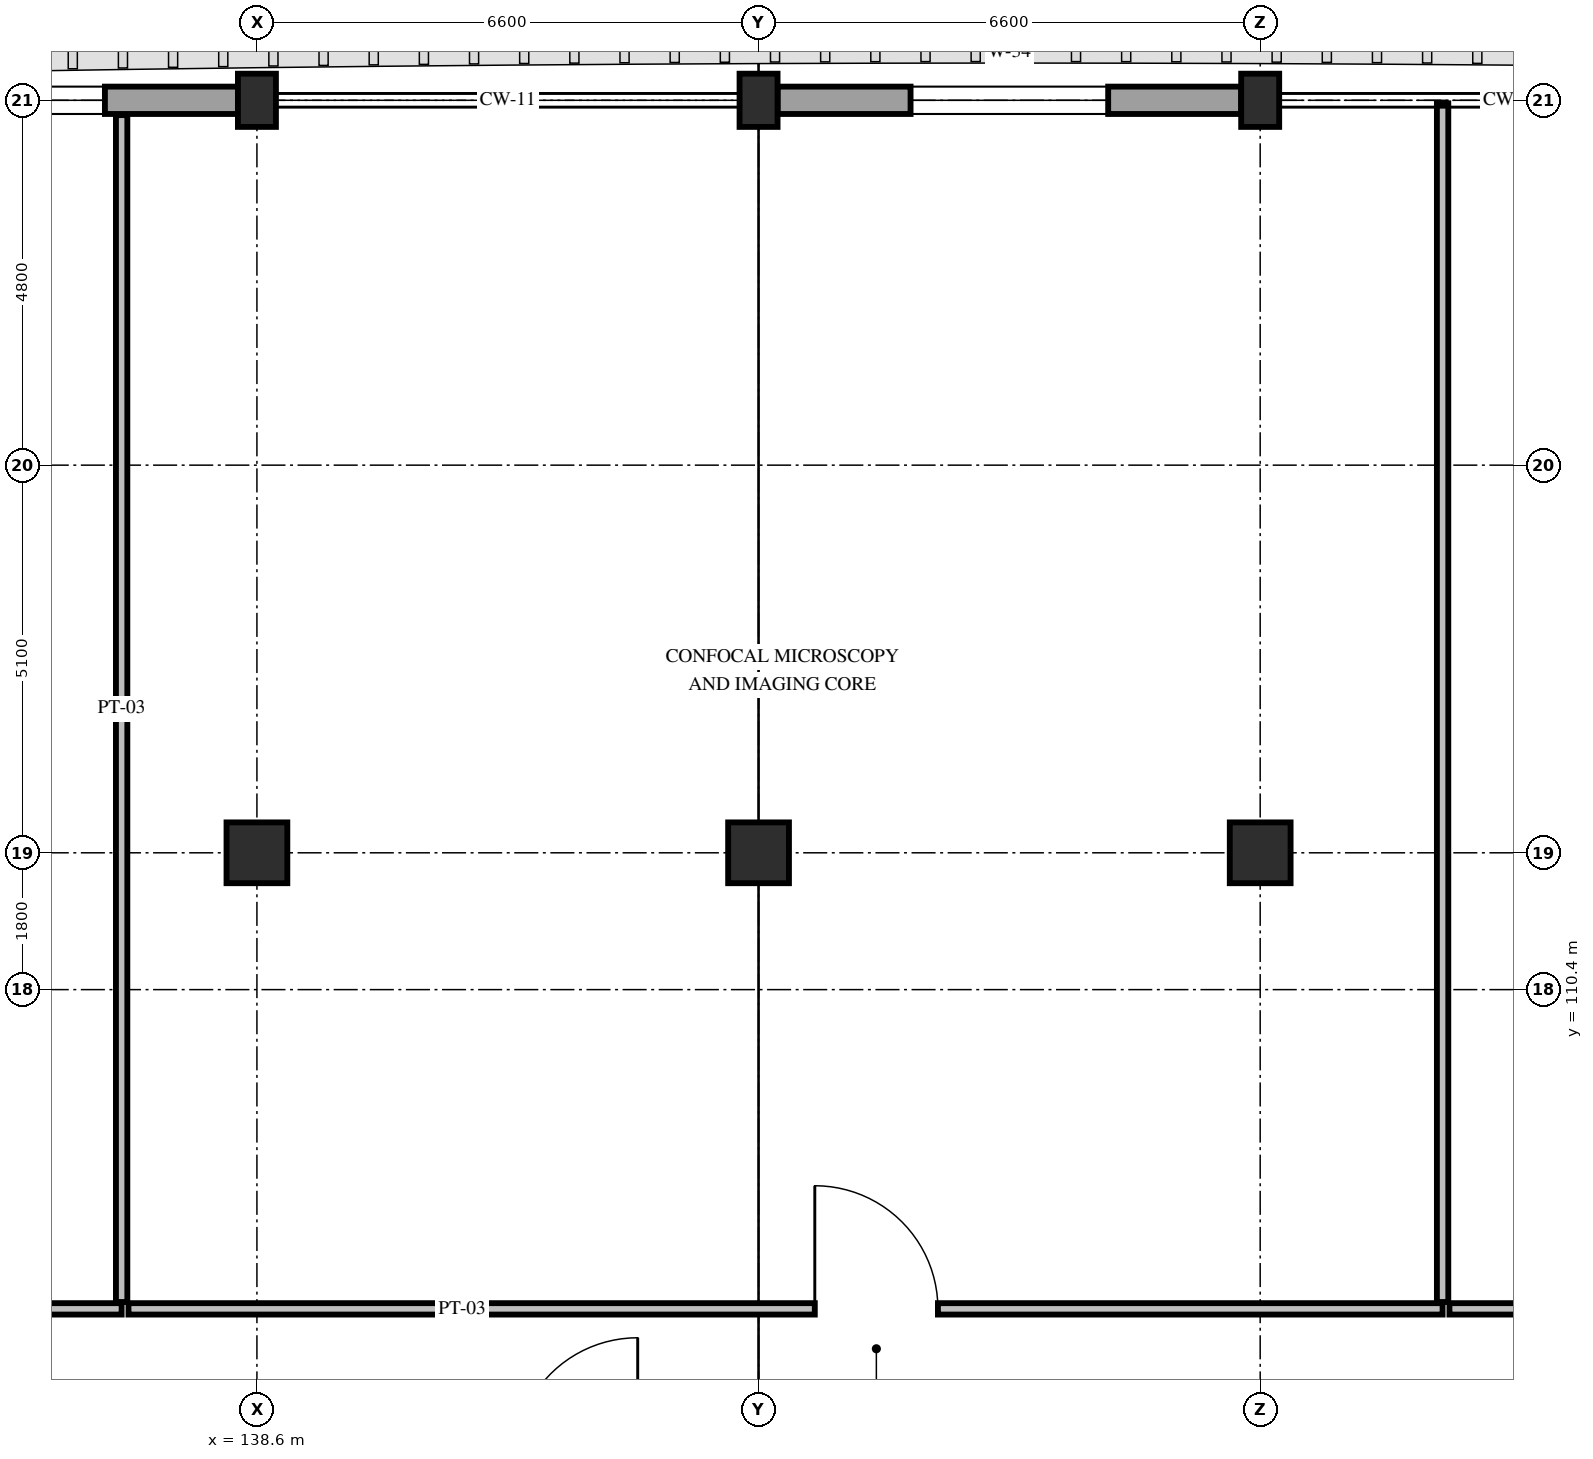
"""IFC4 building model, lengths in metres.
Left out: names, types, materials, properties, quantities, classifications, styles, units other than length and angle.
Written with IfcOpenShell. Run it as: python <this file> out.ifc"""

import sys

from ifc_helpers import new_model, si_unit, direction, frame, frame_2d, origin, origin_2d, place, context, subcontext, project, spatial, rectangle, extrude, element, fill, save


model = new_model("IFC4")
c1 = context("Model", 3, precision=1e-05, world=origin(), true_north=direction((0.0, 1.0)))
c2 = subcontext(c1, "Body", "Model", "MODEL_VIEW")
j1 = project(units=[si_unit("LENGTHUNIT", "METRE"), si_unit("PLANEANGLEUNIT", "RADIAN")], contexts=[c1])
p1 = place(None, origin())
s1 = spatial("IfcSite", under=j1, at=p1, CompositionType="ELEMENT")
p2 = place(p1, origin())
s2 = spatial("IfcBuilding", under=s1, at=p2, CompositionType="ELEMENT")
p3 = place(p2, frame((0.0, 0.0, 10.2)))
s3 = spatial("IfcBuildingStorey", under=s2, at=p3, CompositionType="ELEMENT", Elevation=10.2)
p4 = place(p3, frame((138.6, 112.2, 0.0), z_axis=(0.0, 0.0, 1.0), x_axis=(1.0, 0.0, 0.0)))
e1 = element("IfcColumn", 1, at=p4, inside=s3, PredefinedType="COLUMN", context=c2, shape_type="SweptSolid", body=[
    extrude(rectangle(XDim=0.8, YDim=0.8, at=origin_2d()), origin(), (0.0, 0.0, 1.0), 4.8),
])
p5 = place(p3, frame((138.6, 122.1, 0.0), z_axis=(0.0, 0.0, 1.0), x_axis=(1.0, 0.0, 0.0)))
e2 = element("IfcColumn", 2, at=p5, inside=s3, PredefinedType="PILASTER", context=c2, shape_type="SweptSolid", body=[
    extrude(rectangle(XDim=0.5, YDim=0.7, at=origin_2d()), origin(), (0.0, 0.0, 1.0), 4.8),
])
p6 = place(p3, frame((145.2, 112.2, 0.0), z_axis=(0.0, 0.0, 1.0), x_axis=(1.0, 0.0, 0.0)))
e3 = element("IfcColumn", 3, at=p6, inside=s3, PredefinedType="COLUMN", context=c2, shape_type="SweptSolid", body=[
    extrude(rectangle(XDim=0.8, YDim=0.8, at=origin_2d()), origin(), (0.0, 0.0, 1.0), 4.8),
])
p7 = place(p3, frame((145.2, 122.1, 0.0), z_axis=(0.0, 0.0, 1.0), x_axis=(1.0, 0.0, 0.0)))
e4 = element("IfcColumn", 4, at=p7, inside=s3, PredefinedType="PILASTER", context=c2, shape_type="SweptSolid", body=[
    extrude(rectangle(XDim=0.5, YDim=0.7, at=origin_2d()), origin(), (0.0, 0.0, 1.0), 4.8),
])
p8 = place(p3, frame((151.8, 112.2, 0.0), z_axis=(0.0, 0.0, 1.0), x_axis=(1.0, 0.0, 0.0)))
e5 = element("IfcColumn", 5, at=p8, inside=s3, PredefinedType="COLUMN", context=c2, shape_type="SweptSolid", body=[
    extrude(rectangle(XDim=0.8, YDim=0.8, at=origin_2d()), origin(), (0.0, 0.0, 1.0), 4.8),
])
p9 = place(p3, frame((151.8, 122.1, 0.0), z_axis=(0.0, 0.0, 1.0), x_axis=(1.0, 0.0, 0.0)))
e6 = element("IfcColumn", 6, at=p9, inside=s3, PredefinedType="PILASTER", context=c2, shape_type="SweptSolid", body=[
    extrude(rectangle(XDim=0.5, YDim=0.7, at=origin_2d()), origin(), (0.0, 0.0, 1.0), 4.8),
])
p10 = place(p3, frame((132.25, 122.1, 0.0), z_axis=(0.0, 0.0, 1.0), x_axis=(1.0, 0.0, 0.0)))
e7 = element("IfcWall", 7, at=p10, inside=s3, PredefinedType="STANDARD", context=c2, shape_type="SweptSolid", body=[
    extrude(rectangle(XDim=6.1, YDim=0.36, at=frame_2d((3.05, 0.0))), origin(), (0.0, 0.0, 1.0), 3.78),
])
p11 = place(p10, frame((1.75, 0.0, 0.85)))
e8 = element("IfcOpeningElement", 8, at=p11, cuts=e7, PredefinedType="OPENING", context=c2, shape_type="SweptSolid", body=[
    extrude(rectangle(XDim=2.6, YDim=1.88, at=frame_2d((1.3, 0.94))), frame((0.0, 0.195, 0.0), z_axis=(0.0, -1.0, 0.0), x_axis=(1.0, 0.0, 0.0)), (0.0, 0.0, 1.0), 0.39),
])
p12 = place(p3, frame((145.45, 122.1, 0.0), z_axis=(0.0, 0.0, 1.0), x_axis=(1.0, 0.0, 0.0)))
e9 = element("IfcWall", 9, at=p12, inside=s3, PredefinedType="STANDARD", context=c2, shape_type="SweptSolid", body=[
    extrude(rectangle(XDim=6.1, YDim=0.36, at=frame_2d((3.05, 0.0))), origin(), (0.0, 0.0, 1.0), 3.78),
])
p13 = place(p12, frame((1.75, 0.0, 0.85)))
e10 = element("IfcOpeningElement", 10, at=p13, cuts=e9, PredefinedType="OPENING", context=c2, shape_type="SweptSolid", body=[
    extrude(rectangle(XDim=2.6, YDim=1.88, at=frame_2d((1.3, 0.94))), frame((0.0, 0.195, 0.0), z_axis=(0.0, -1.0, 0.0), x_axis=(1.0, 0.0, 0.0)), (0.0, 0.0, 1.0), 0.39),
])
p14 = place(p3, frame((119.04, 106.2, 0.0), z_axis=(0.0, 0.0, 1.0), x_axis=(1.0, 0.0, 0.0)))
e11 = element("IfcWall", 11, at=p14, inside=s3, PredefinedType="PARTITIONING", context=c2, shape_type="SweptSolid", body=[
    extrude(rectangle(XDim=17.78, YDim=0.15, at=frame_2d((8.89, 0.0))), origin(), (0.0, 0.0, 1.0), 3.78),
])
p15 = place(p14, frame((8.16, 0.0, 0.0)))
e12 = element("IfcOpeningElement", 12, at=p15, cuts=e11, PredefinedType="OPENING", context=c2, shape_type="SweptSolid", body=[
    extrude(rectangle(XDim=1.5, YDim=2.25, at=frame_2d((0.75, 1.125))), frame((0.0, 0.09, 0.0), z_axis=(0.0, -1.0, 0.0), x_axis=(1.0, 0.0, 0.0)), (0.0, 0.0, 1.0), 0.18),
])
p16 = place(p3, frame((136.82, 106.29, 0.0), z_axis=(0.0, 0.0, 1.0), x_axis=(0.0, 1.0, 0.0)))
e13 = element("IfcWall", 13, at=p16, inside=s3, PredefinedType="PARTITIONING", context=c2, shape_type="SweptSolid", body=[
    extrude(rectangle(XDim=15.615, YDim=0.15, at=frame_2d((7.808, 0.0))), origin(), (0.0, 0.0, 1.0), 3.93),
])
p17 = place(p3, frame((136.91, 106.2, 0.0), z_axis=(0.0, 0.0, 1.0), x_axis=(1.0, 0.0, 0.0)))
e14 = element("IfcWall", 14, at=p17, inside=s3, PredefinedType="PARTITIONING", context=c2, shape_type="SweptSolid", body=[
    extrude(rectangle(XDim=17.29, YDim=0.15, at=frame_2d((8.645, 0.0))), origin(), (0.0, 0.0, 1.0), 3.78),
])
p18 = place(p17, frame((9.03, 0.0, 0.0)))
e15 = element("IfcOpeningElement", 15, at=p18, cuts=e14, PredefinedType="OPENING", context=c2, shape_type="SweptSolid", body=[
    extrude(rectangle(XDim=1.62, YDim=2.3, at=frame_2d((0.81, 1.15))), frame((0.0, 0.09, 0.0), z_axis=(0.0, -1.0, 0.0), x_axis=(1.0, 0.0, 0.0)), (0.0, 0.0, 1.0), 0.18),
])
p19 = place(p3, frame((154.2, 106.29, 0.0), z_axis=(0.0, 0.0, 1.0), x_axis=(0.0, 1.0, 0.0)))
e16 = element("IfcWall", 16, at=p19, inside=s3, PredefinedType="PARTITIONING", context=c2, shape_type="SweptSolid", body=[
    extrude(rectangle(XDim=15.77, YDim=0.15, at=frame_2d((7.885, 0.0))), origin(), (0.0, 0.0, 1.0), 3.93),
])
p20 = place(p3, frame((154.29, 106.2, 0.0), z_axis=(0.0, 0.0, 1.0), x_axis=(1.0, 0.0, 0.0)))
e17 = element("IfcWall", 17, at=p20, inside=s3, PredefinedType="PARTITIONING", context=c2, shape_type="SweptSolid", body=[
    extrude(rectangle(XDim=9.31, YDim=0.15, at=frame_2d((4.655, 0.0))), origin(), (0.0, 0.0, 1.0), 3.78),
])
p21 = place(p20, frame((4.99, 0.0, 0.0)))
e18 = element("IfcOpeningElement", 18, at=p21, cuts=e17, PredefinedType="OPENING", context=c2, shape_type="SweptSolid", body=[
    extrude(rectangle(XDim=1.34, YDim=2.2, at=frame_2d((0.67, 1.1))), frame((0.0, 0.09, 0.0), z_axis=(0.0, -1.0, 0.0), x_axis=(1.0, 0.0, 0.0)), (0.0, 0.0, 1.0), 0.18),
])
p22 = place(p11, origin())
e19 = element("IfcWindow", 19, at=p22, inside=s3, PartitioningType="DOUBLE_PANEL_VERTICAL", PredefinedType="WINDOW", context=c2, shape_type="SweptSolid", body=[
    extrude(rectangle(XDim=2.6, YDim=1.88, at=frame_2d((1.3, 0.94))), frame((0.0, 0.03, 0.0), z_axis=(0.0, -1.0, 0.0), x_axis=(1.0, 0.0, 0.0)), (0.0, 0.0, 1.0), 0.06),
])
fill(e8, e19)
p23 = place(p13, origin())
e20 = element("IfcWindow", 20, at=p23, inside=s3, PartitioningType="DOUBLE_PANEL_VERTICAL", PredefinedType="WINDOW", context=c2, shape_type="SweptSolid", body=[
    extrude(rectangle(XDim=2.6, YDim=1.88, at=frame_2d((1.3, 0.94))), frame((0.0, 0.03, 0.0), z_axis=(0.0, -1.0, 0.0), x_axis=(1.0, 0.0, 0.0)), (0.0, 0.0, 1.0), 0.06),
])
fill(e10, e20)
p24 = place(p18, origin())
e21 = element("IfcDoor", 21, at=p24, inside=s3, OperationType="SINGLE_SWING_LEFT", PredefinedType="DOOR", context=c2, shape_type="SweptSolid", body=[
    extrude(rectangle(XDim=1.62, YDim=2.3, at=frame_2d((0.81, 1.15))), frame((0.0, 0.025, 0.0), z_axis=(0.0, -1.0, 0.0), x_axis=(1.0, 0.0, 0.0)), (0.0, 0.0, 1.0), 0.05),
])
fill(e15, e21)
save(model, sys.argv[1])
